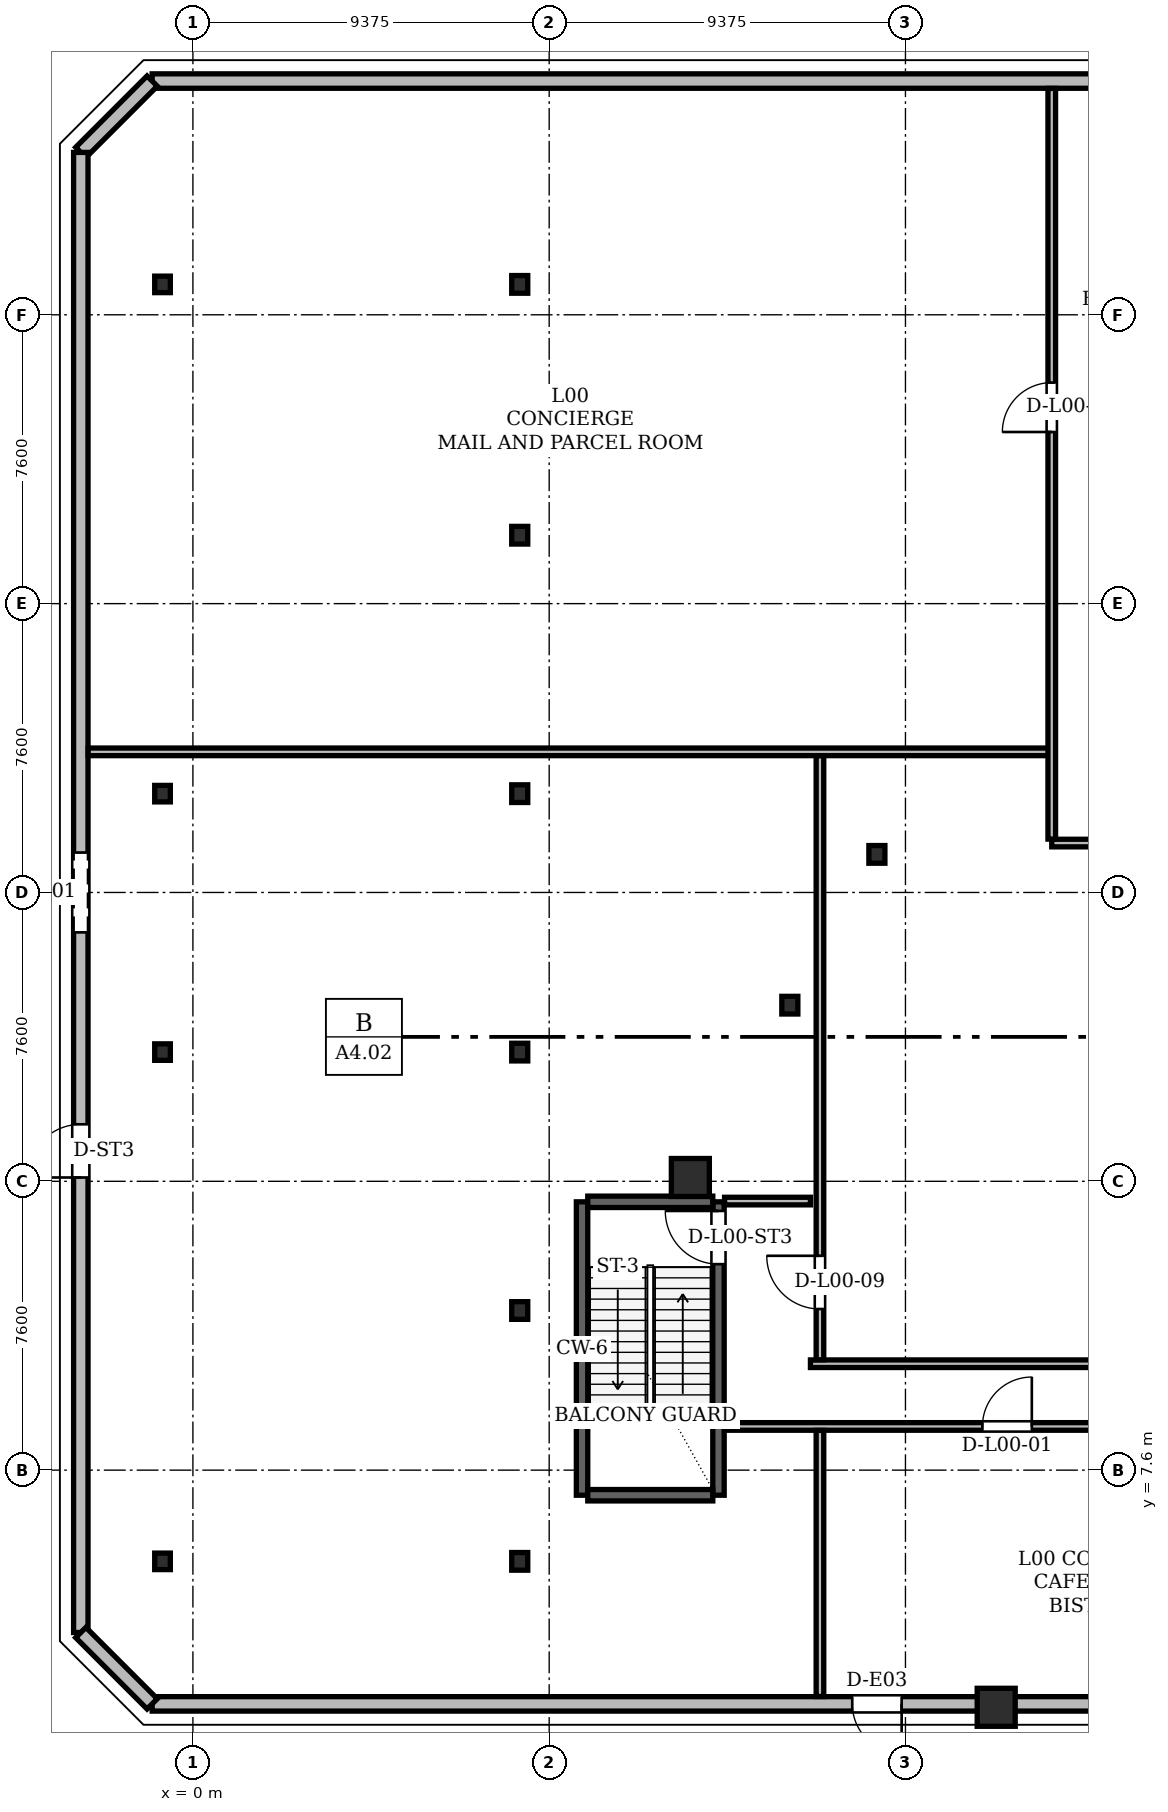
"""IFC4 building model, lengths in metres.
Left out: names, types, materials, properties, quantities, classifications, styles, units other than length and angle.
Written with IfcOpenShell. Run it as: python <this file> out.ifc"""

import sys

from ifc_helpers import new_model, si_unit, direction, frame, frame_2d, origin, origin_2d, place, context, subcontext, project, spatial, rectangle, hollow_rectangle, i_section, extrude, element, fill, save


model = new_model("IFC4")
c1 = context("Model", 3, precision=1e-05, world=origin(), true_north=direction((0.0, 1.0)))
c2 = subcontext(c1, "Body", "Model", "MODEL_VIEW")
j1 = project(units=[si_unit("LENGTHUNIT", "METRE"), si_unit("PLANEANGLEUNIT", "RADIAN")], contexts=[c1])
p1 = place(None, origin())
s1 = spatial("IfcSite", under=j1, at=p1, CompositionType="ELEMENT")
p2 = place(p1, origin())
s2 = spatial("IfcBuilding", under=s1, at=p2, CompositionType="ELEMENT")
p3 = place(p2, origin())
s3 = spatial("IfcBuildingStorey", under=s2, at=p3, CompositionType="ELEMENT", Elevation=0.0)
for number, where, z_axis, x_axis in (
    (1, (13.09, 15.3, 0.004), (0.0, 0.0, 1.0), (1.0, 0.0, 0.0)),
    (2, (21.138, 1.36, 0.004), (0.0, 0.0, 1.0), (1.0, 0.0, 0.0)),
):
    element("IfcColumn", number, at=place(p3, frame(where, z_axis=z_axis, x_axis=x_axis)), inside=s3, PredefinedType="COLUMN", context=c2, shape_type="SweptSolid", body=[
        extrude(hollow_rectangle(XDim=1.0, YDim=1.0, WallThickness=0.085, at=origin_2d()), origin(), (0.0, 0.0, 1.0), 5.391),
    ])
for number, where, z_axis, x_axis in (
    (3, (17.998, 23.802, 0.004), (0.0, 0.0, 1.0), (1.0, 0.0, 0.0)),
    (4, (15.708, 19.834, 0.004), (0.0, 0.0, 1.0), (1.0, 0.0, 0.0)),
):
    element("IfcColumn", number, at=place(p3, frame(where, z_axis=z_axis, x_axis=x_axis)), inside=s3, PredefinedType="COLUMN", context=c2, shape_type="SweptSolid", body=[
        extrude(i_section(OverallWidth=0.422, OverallDepth=0.465, WebThickness=0.045, FlangeThickness=0.072, at=origin_2d()), origin(), (0.0, 0.0, 1.0), 5.391),
    ])
for number, where, z_axis, x_axis in (
    (5, (8.6, 5.2, 0.0), (0.0, 0.0, 1.0), (1.0, 0.0, 0.0)),
    (6, (8.6, 11.8, 0.0), (0.0, 0.0, 1.0), (1.0, 0.0, 0.0)),
    (7, (8.6, 18.6, 0.0), (0.0, 0.0, 1.0), (1.0, 0.0, 0.0)),
    (8, (8.6, 25.4, 0.0), (0.0, 0.0, 1.0), (1.0, 0.0, 0.0)),
    (9, (8.6, 32.2, 0.0), (0.0, 0.0, 1.0), (1.0, 0.0, 0.0)),
    (10, (8.6, 38.8, 0.0), (0.0, 0.0, 1.0), (1.0, 0.0, 0.0)),
):
    element("IfcColumn", number, at=place(p3, frame(where, z_axis=z_axis, x_axis=x_axis)), inside=s3, PredefinedType="COLUMN", context=c2, shape_type="SweptSolid", body=[
        extrude(i_section(OverallWidth=0.422, OverallDepth=0.465, WebThickness=0.045, FlangeThickness=0.072, at=origin_2d()), origin(), (0.0, 0.0, 1.0), 5.4),
    ])
for number, where, z_axis, x_axis in (
    (11, (-0.8, 5.2, 0.0), (0.0, 0.0, 1.0), (1.0, 0.0, 0.0)),
    (12, (-0.8, 18.6, 0.0), (0.0, 0.0, 1.0), (1.0, 0.0, 0.0)),
    (13, (-0.8, 25.4, 0.0), (0.0, 0.0, 1.0), (1.0, 0.0, 0.0)),
    (14, (-0.8, 38.8, 0.0), (0.0, 0.0, 1.0), (1.0, 0.0, 0.0)),
):
    element("IfcColumn", number, at=place(p3, frame(where, z_axis=z_axis, x_axis=x_axis)), inside=s3, PredefinedType="COLUMN", context=c2, shape_type="SweptSolid", body=[
        extrude(i_section(OverallWidth=0.411, OverallDepth=0.434, WebThickness=0.036, FlangeThickness=0.057, at=origin_2d()), origin(), (0.0, 0.0, 1.0), 5.4),
    ])
p4 = place(p3, frame((10.24, 6.94, 0.0), z_axis=(0.0, 0.0, 1.0), x_axis=(0.0, 1.0, 0.0)))
e15 = element("IfcWall", 15, at=p4, inside=s3, PredefinedType="SHEAR", context=c2, shape_type="SweptSolid", body=[
    extrude(rectangle(XDim=7.72, YDim=0.3, at=frame_2d((3.86, 0.0))), origin(), (0.0, 0.0, 1.0), 5.12),
])
p5 = place(p3, frame((13.83, 6.94, 0.0), z_axis=(0.0, 0.0, 1.0), x_axis=(0.0, 1.0, 0.0)))
e16 = element("IfcWall", 16, at=p5, inside=s3, PredefinedType="SHEAR", context=c2, shape_type="SweptSolid", body=[
    extrude(rectangle(XDim=7.72, YDim=0.3, at=frame_2d((3.86, 0.0))), origin(), (0.0, 0.0, 1.0), 5.12),
])
p6 = place(p5, frame((6.08, 0.0, 0.0)))
e17 = element("IfcOpeningElement", 17, at=p6, cuts=e16, PredefinedType="OPENING", context=c2, shape_type="SweptSolid", body=[
    extrude(rectangle(XDim=1.4, YDim=2.2, at=frame_2d((0.7, 1.1))), frame((0.0, 0.15, 0.0), z_axis=(0.0, -1.0, 0.0), x_axis=(1.0, 0.0, 0.0)), (0.0, 0.0, 1.0), 0.3),
])
for number, where, z_axis, x_axis in (
    (18, (10.39, 6.94, 0.0), (0.0, 0.0, 1.0), (1.0, 0.0, 0.0)),
    (19, (10.39, 14.66, 0.0), (0.0, 0.0, 1.0), (1.0, 0.0, 0.0)),
):
    element("IfcWall", number, at=place(p3, frame(where, z_axis=z_axis, x_axis=x_axis)), inside=s3, PredefinedType="SHEAR", context=c2, shape_type="SweptSolid", body=[
        extrude(rectangle(XDim=3.29, YDim=0.3, at=frame_2d((1.645, 0.0))), origin(), (0.0, 0.0, 1.0), 5.12),
    ])
p7 = place(p3, frame((76.072, 1.45, 0.0), z_axis=(0.0, 0.0, 1.0), x_axis=(-1.0, 0.0, 0.0)))
e20 = element("IfcWall", 20, at=p7, inside=s3, PredefinedType="SOLIDWALL", context=c2, shape_type="SweptSolid", body=[
    extrude(rectangle(XDim=77.145, YDim=0.38, at=frame_2d((38.572, 0.0))), origin(), (0.0, 0.0, 1.0), 4.183),
])
p8 = place(p7, frame((40.972, 0.0, 0.0)))
e21 = element("IfcOpeningElement", 21, at=p8, cuts=e20, PredefinedType="OPENING", context=c2, shape_type="SweptSolid", body=[
    extrude(rectangle(XDim=1.8, YDim=2.35, at=frame_2d((0.9, 1.175))), frame((0.0, 0.19, 0.0), z_axis=(0.0, -1.0, 0.0), x_axis=(1.0, 0.0, 0.0)), (0.0, 0.0, 1.0), 0.38),
])
p9 = place(p7, frame((34.372, 0.0, 0.0)))
e22 = element("IfcOpeningElement", 22, at=p9, cuts=e20, PredefinedType="OPENING", context=c2, shape_type="SweptSolid", body=[
    extrude(rectangle(XDim=1.8, YDim=2.35, at=frame_2d((0.9, 1.175))), frame((0.0, 0.19, 0.0), z_axis=(0.0, -1.0, 0.0), x_axis=(1.0, 0.0, 0.0)), (0.0, 0.0, 1.0), 0.38),
])
p10 = place(p7, frame((57.422, 0.0, 0.0)))
e23 = element("IfcOpeningElement", 23, at=p10, cuts=e20, PredefinedType="OPENING", context=c2, shape_type="SweptSolid", body=[
    extrude(rectangle(XDim=1.3, YDim=2.25, at=frame_2d((0.65, 1.125))), frame((0.0, 0.19, 0.0), z_axis=(0.0, -1.0, 0.0), x_axis=(1.0, 0.0, 0.0)), (0.0, 0.0, 1.0), 0.38),
])
p11 = place(p7, frame((23.622, 0.0, 0.0)))
e24 = element("IfcOpeningElement", 24, at=p11, cuts=e20, PredefinedType="OPENING", context=c2, shape_type="SweptSolid", body=[
    extrude(rectangle(XDim=1.3, YDim=2.25, at=frame_2d((0.65, 1.125))), frame((0.0, 0.19, 0.0), z_axis=(0.0, -1.0, 0.0), x_axis=(1.0, 0.0, 0.0)), (0.0, 0.0, 1.0), 0.38),
])
p12 = place(p3, frame((-1.072, 44.15, 0.0), z_axis=(0.0, 0.0, 1.0), x_axis=(1.0, 0.0, 0.0)))
e25 = element("IfcWall", 25, at=p12, inside=s3, PredefinedType="SOLIDWALL", context=c2, shape_type="SweptSolid", body=[
    extrude(rectangle(XDim=77.145, YDim=0.38, at=frame_2d((38.572, 0.0))), origin(), (0.0, 0.0, 1.0), 5.12),
])
p13 = place(p12, frame((24.872, 0.0, 0.0)))
e26 = element("IfcOpeningElement", 26, at=p13, cuts=e25, PredefinedType="OPENING", context=c2, shape_type="SweptSolid", body=[
    extrude(rectangle(XDim=1.4, YDim=2.2, at=frame_2d((0.7, 1.1))), frame((0.0, 0.19, 0.0), z_axis=(0.0, -1.0, 0.0), x_axis=(1.0, 0.0, 0.0)), (0.0, 0.0, 1.0), 0.38),
])
p14 = place(p12, frame((39.472, 0.0, 0.0)))
e27 = element("IfcOpeningElement", 27, at=p14, cuts=e25, PredefinedType="OPENING", context=c2, shape_type="SweptSolid", body=[
    extrude(rectangle(XDim=3.2, YDim=3.0, at=frame_2d((1.6, 1.5))), frame((0.0, 0.19, 0.0), z_axis=(0.0, -1.0, 0.0), x_axis=(1.0, 0.0, 0.0)), (0.0, 0.0, 1.0), 0.38),
])
p15 = place(p3, frame((-2.95, 42.272, 0.0), z_axis=(0.0, 0.0, 1.0), x_axis=(0.707106781187, 0.707106781187, 0.0)))
e28 = element("IfcWall", 28, at=p15, inside=s3, PredefinedType="SOLIDWALL", context=c2, shape_type="SweptSolid", body=[
    extrude(rectangle(XDim=2.656, YDim=0.38, at=frame_2d((1.328, 0.0))), origin(), (0.0, 0.0, 1.0), 5.12),
])
p16 = place(p3, frame((-2.95, 3.328, 0.0), z_axis=(0.0, 0.0, 1.0), x_axis=(0.0, 1.0, 0.0)))
e29 = element("IfcWall", 29, at=p16, inside=s3, PredefinedType="SOLIDWALL", context=c2, shape_type="SweptSolid", body=[
    extrude(rectangle(XDim=38.944, YDim=0.38, at=frame_2d((19.472, 0.0))), origin(), (0.0, 0.0, 1.0), 5.12),
])
p17 = place(p16, frame((11.972, 0.0, 0.0)))
e30 = element("IfcOpeningElement", 30, at=p17, cuts=e29, PredefinedType="OPENING", context=c2, shape_type="SweptSolid", body=[
    extrude(rectangle(XDim=1.4, YDim=2.2, at=frame_2d((0.7, 1.1))), frame((0.0, 0.19, 0.0), z_axis=(0.0, -1.0, 0.0), x_axis=(1.0, 0.0, 0.0)), (0.0, 0.0, 1.0), 0.38),
])
p18 = place(p16, frame((18.422, 0.0, 0.0)))
e31 = element("IfcOpeningElement", 31, at=p18, cuts=e29, PredefinedType="OPENING", context=c2, shape_type="SweptSolid", body=[
    extrude(rectangle(XDim=2.1, YDim=2.3, at=frame_2d((1.05, 1.15))), frame((0.0, 0.19, 0.0), z_axis=(0.0, -1.0, 0.0), x_axis=(1.0, 0.0, 0.0)), (0.0, 0.0, 1.0), 0.38),
])
p19 = place(p3, frame((-1.072, 1.45, 0.0), z_axis=(0.0, 0.0, 1.0), x_axis=(-0.707060812925, 0.70715274646, 0.0)))
e32 = element("IfcWall", 32, at=p19, inside=s3, PredefinedType="SOLIDWALL", context=c2, shape_type="SweptSolid", body=[
    extrude(rectangle(XDim=2.656, YDim=0.38, at=frame_2d((1.328, 0.0))), origin(), (0.0, 0.0, 1.0), 5.12),
])
p20 = place(p3, frame((13.99, 8.75, 0.0), z_axis=(0.0, 0.0, 1.0), x_axis=(1.0, 0.0, 0.0)))
e33 = element("IfcWall", 33, at=p20, inside=s3, PredefinedType="PARTITIONING", context=c2, shape_type="SweptSolid", body=[
    extrude(rectangle(XDim=41.61, YDim=0.2, at=frame_2d((20.805, 0.0))), origin(), (0.0, 0.0, 1.0), 4.183),
])
p21 = place(p20, frame((6.785, 0.0, 0.0)))
e34 = element("IfcOpeningElement", 34, at=p21, cuts=e33, PredefinedType="OPENING", context=c2, shape_type="SweptSolid", body=[
    extrude(rectangle(XDim=1.3, YDim=2.2, at=frame_2d((0.65, 1.1))), frame((0.0, 0.1, 0.0), z_axis=(0.0, -1.0, 0.0), x_axis=(1.0, 0.0, 0.0)), (0.0, 0.0, 1.0), 0.2),
])
p22 = place(p20, frame((23.235, 0.0, 0.0)))
e35 = element("IfcOpeningElement", 35, at=p22, cuts=e33, PredefinedType="OPENING", context=c2, shape_type="SweptSolid", body=[
    extrude(rectangle(XDim=1.3, YDim=2.2, at=frame_2d((0.65, 1.1))), frame((0.0, 0.1, 0.0), z_axis=(0.0, -1.0, 0.0), x_axis=(1.0, 0.0, 0.0)), (0.0, 0.0, 1.0), 0.2),
])
p23 = place(p20, frame((37.534, 0.0, 0.0)))
e36 = element("IfcOpeningElement", 36, at=p23, cuts=e33, PredefinedType="OPENING", context=c2, shape_type="SweptSolid", body=[
    extrude(rectangle(XDim=1.0, YDim=2.18, at=frame_2d((0.5, 1.09))), frame((0.0, 0.1, 0.0), z_axis=(0.0, -1.0, 0.0), x_axis=(1.0, 0.0, 0.0)), (0.0, 0.0, 1.0), 0.2),
])
p24 = place(p3, frame((16.25, 10.4, 0.0), z_axis=(0.0, 0.0, 1.0), x_axis=(1.0, 0.0, 0.0)))
e37 = element("IfcWall", 37, at=p24, inside=s3, PredefinedType="PARTITIONING", context=c2, shape_type="SweptSolid", body=[
    extrude(rectangle(XDim=10.8, YDim=0.2, at=frame_2d((5.4, 0.0))), origin(), (0.0, 0.0, 1.0), 5.12),
])
p25 = place(p3, frame((13.99, 14.68, 0.0), z_axis=(0.0, 0.0, 1.0), x_axis=(1.0, 0.0, 0.0)))
e38 = element("IfcWall", 38, at=p25, inside=s3, PredefinedType="PARTITIONING", context=c2, shape_type="SweptSolid", body=[
    extrude(rectangle(XDim=2.26, YDim=0.2, at=frame_2d((1.13, 0.0))), origin(), (0.0, 0.0, 1.0), 4.183),
])
p26 = place(p3, frame((22.6, 24.1, 0.0), z_axis=(0.0, 0.0, 1.0), x_axis=(1.0, 0.0, 0.0)))
e39 = element("IfcWall", 39, at=p26, inside=s3, PredefinedType="PARTITIONING", context=c2, shape_type="SweptSolid", body=[
    extrude(rectangle(XDim=4.45, YDim=0.2, at=frame_2d((2.225, 0.0))), origin(), (0.0, 0.0, 1.0), 5.12),
])
p27 = place(p3, frame((-2.756, 26.5, 0.0), z_axis=(0.0, 0.0, 1.0), x_axis=(1.0, 0.0, 0.0)))
e40 = element("IfcWall", 40, at=p27, inside=s3, PredefinedType="PARTITIONING", context=c2, shape_type="SweptSolid", body=[
    extrude(rectangle(XDim=25.356, YDim=0.2, at=frame_2d((12.678, 0.0))), origin(), (0.0, 0.0, 1.0), 4.183),
])
p28 = place(p3, frame((16.5, 1.644, 0.0), z_axis=(0.0, 0.0, 1.0), x_axis=(0.0, 1.0, 0.0)))
e41 = element("IfcWall", 41, at=p28, inside=s3, PredefinedType="PARTITIONING", context=c2, shape_type="SweptSolid", body=[
    extrude(rectangle(XDim=7.002, YDim=0.2, at=frame_2d((3.501, 0.0))), origin(), (0.0, 0.0, 1.0), 5.12),
])
p29 = place(p3, frame((16.5, 10.504, 0.0), z_axis=(0.0, 0.0, 1.0), x_axis=(0.0, 1.0, 0.0)))
e42 = element("IfcWall", 42, at=p29, inside=s3, PredefinedType="PARTITIONING", context=c2, shape_type="SweptSolid", body=[
    extrude(rectangle(XDim=15.892, YDim=0.2, at=frame_2d((7.946, 0.0))), origin(), (0.0, 0.0, 1.0), 4.183),
])
p30 = place(p29, frame((1.336, 0.0, 0.0)))
e43 = element("IfcOpeningElement", 43, at=p30, cuts=e42, PredefinedType="OPENING", context=c2, shape_type="SweptSolid", body=[
    extrude(rectangle(XDim=1.4, YDim=2.2, at=frame_2d((0.7, 1.1))), frame((0.0, 0.1, 0.0), z_axis=(0.0, -1.0, 0.0), x_axis=(1.0, 0.0, 0.0)), (0.0, 0.0, 1.0), 0.2),
])
p31 = place(p3, frame((22.6, 24.204, 0.0), z_axis=(0.0, 0.0, 1.0), x_axis=(0.0, 1.0, 0.0)))
e44 = element("IfcWall", 44, at=p31, inside=s3, PredefinedType="PARTITIONING", context=c2, shape_type="SweptSolid", body=[
    extrude(rectangle(XDim=19.752, YDim=0.2, at=frame_2d((9.876, 0.0))), origin(), (0.0, 0.0, 1.0), 3.91),
])
p32 = place(p31, frame((10.712, 0.0, 0.0)))
e45 = element("IfcOpeningElement", 45, at=p32, cuts=e44, PredefinedType="OPENING", context=c2, shape_type="SweptSolid", body=[
    extrude(rectangle(XDim=1.3, YDim=2.2, at=frame_2d((0.65, 1.1))), frame((0.0, 0.1, 0.0), z_axis=(0.0, -1.0, 0.0), x_axis=(1.0, 0.0, 0.0)), (0.0, 0.0, 1.0), 0.2),
])
p33 = place(p10, origin())
e46 = element("IfcDoor", 46, at=p33, inside=s3, OperationType="SINGLE_SWING_LEFT", PredefinedType="DOOR", context=c2, shape_type="SweptSolid", body=[
    extrude(rectangle(XDim=1.3, YDim=2.25, at=frame_2d((0.65, 1.125))), frame((0.0, 0.025, 0.0), z_axis=(0.0, -1.0, 0.0), x_axis=(1.0, 0.0, 0.0)), (0.0, 0.0, 1.0), 0.05),
])
fill(e23, e46)
p34 = place(p17, origin())
e47 = element("IfcDoor", 47, at=p34, inside=s3, OperationType="SINGLE_SWING_LEFT", PredefinedType="DOOR", context=c2, shape_type="SweptSolid", body=[
    extrude(rectangle(XDim=1.4, YDim=2.2, at=frame_2d((0.7, 1.1))), frame((0.0, 0.025, 0.0), z_axis=(0.0, -1.0, 0.0), x_axis=(1.0, 0.0, 0.0)), (0.0, 0.0, 1.0), 0.05),
])
fill(e30, e47)
p35 = place(p18, origin())
e48 = element("IfcDoor", 48, at=p35, inside=s3, OperationType="SINGLE_SWING_RIGHT", PredefinedType="GATE", context=c2, shape_type="SweptSolid", body=[
    extrude(rectangle(XDim=2.1, YDim=2.3, at=frame_2d((1.05, 1.15))), frame((0.0, 0.025, 0.0), z_axis=(0.0, -1.0, 0.0), x_axis=(1.0, 0.0, 0.0)), (0.0, 0.0, 1.0), 0.05),
])
fill(e31, e48)
p36 = place(p6, origin())
e49 = element("IfcDoor", 49, at=p36, inside=s3, OperationType="SINGLE_SWING_RIGHT", PredefinedType="DOOR", context=c2, shape_type="SweptSolid", body=[
    extrude(rectangle(XDim=1.4, YDim=2.2, at=frame_2d((0.7, 1.1))), frame((0.0, 0.025, 0.0), z_axis=(0.0, -1.0, 0.0), x_axis=(1.0, 0.0, 0.0)), (0.0, 0.0, 1.0), 0.05),
])
fill(e17, e49)
p37 = place(p21, origin())
e50 = element("IfcDoor", 50, at=p37, inside=s3, OperationType="SINGLE_SWING_RIGHT", PredefinedType="DOOR", context=c2, shape_type="SweptSolid", body=[
    extrude(rectangle(XDim=1.3, YDim=2.2, at=frame_2d((0.65, 1.1))), frame((0.0, 0.025, 0.0), z_axis=(0.0, -1.0, 0.0), x_axis=(1.0, 0.0, 0.0)), (0.0, 0.0, 1.0), 0.05),
])
fill(e34, e50)
p38 = place(p30, origin())
e51 = element("IfcDoor", 51, at=p38, inside=s3, OperationType="SINGLE_SWING_RIGHT", PredefinedType="DOOR", context=c2, shape_type="SweptSolid", body=[
    extrude(rectangle(XDim=1.4, YDim=2.2, at=frame_2d((0.7, 1.1))), frame((0.0, 0.025, 0.0), z_axis=(0.0, -1.0, 0.0), x_axis=(1.0, 0.0, 0.0)), (0.0, 0.0, 1.0), 0.05),
])
fill(e43, e51)
p39 = place(p32, origin())
e52 = element("IfcDoor", 52, at=p39, inside=s3, OperationType="SINGLE_SWING_LEFT", PredefinedType="DOOR", context=c2, shape_type="SweptSolid", body=[
    extrude(rectangle(XDim=1.3, YDim=2.2, at=frame_2d((0.65, 1.1))), frame((0.0, 0.025, 0.0), z_axis=(0.0, -1.0, 0.0), x_axis=(1.0, 0.0, 0.0)), (0.0, 0.0, 1.0), 0.05),
])
fill(e45, e52)
save(model, sys.argv[1])
